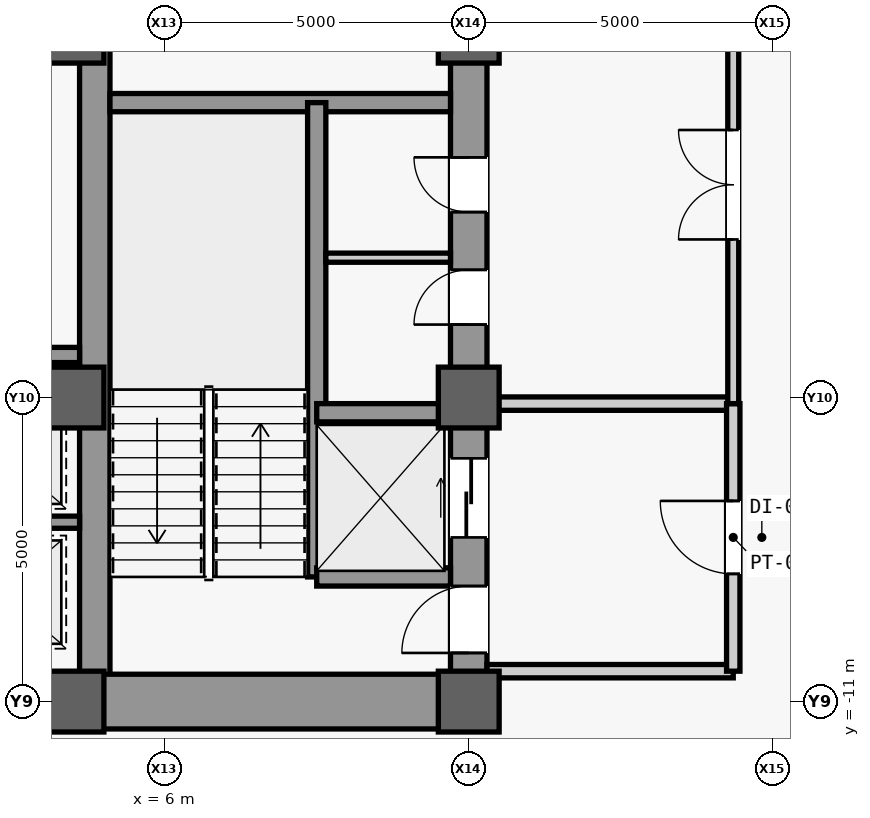
"""IFC4 building model, lengths in metres.
Left out: names, types, materials, properties, quantities, classifications, styles, units other than length and angle.
Written with IfcOpenShell. Run it as: python <this file> out.ifc"""

import sys

from ifc_helpers import new_model, si_unit, direction, frame, frame_2d, origin, origin_2d, place, context, subcontext, project, spatial, rectangle, extrude, source, transform, mapped, element, fill, save


model = new_model("IFC4")
c1 = context("Model", 3, precision=1e-05, world=origin(), true_north=direction((0.0, 1.0)))
c2 = subcontext(c1, "Body", "Model", "MODEL_VIEW")
j1 = project(units=[si_unit("LENGTHUNIT", "METRE"), si_unit("PLANEANGLEUNIT", "RADIAN")], contexts=[c1])
p1 = place(None, origin())
s1 = spatial("IfcSite", under=j1, at=p1, CompositionType="ELEMENT")
p2 = place(p1, origin())
s2 = spatial("IfcBuilding", under=s1, at=p2, CompositionType="ELEMENT")
p3 = place(p2, frame((0.0, 0.0, 83.0)))
s3 = spatial("IfcBuildingStorey", under=s2, at=p3, CompositionType="ELEMENT", Elevation=83.0)
m1 = source(origin(), c2, "Body", "SweptSolid", [
    extrude(rectangle(XDim=22.0, YDim=0.6, at=frame_2d((11.0, 0.0))), origin(), (0.0, 0.0, 1.0), 3.94),
])
p4 = place(p3, frame((11.0, -11.0, 0.0), z_axis=(0.0, 0.0, 1.0), x_axis=(0.0, 1.0, 0.0)))
e1 = element("IfcWall", 1, at=p4, inside=s3, PredefinedType="SHEAR", context=c2, shape_type="MappedRepresentation", body=[
    mapped(m1, transform((0.0, 0.0, 0.0), scale=1.0)),
])
m2 = source(origin(), c2, "Body", "SweptSolid", [
    extrude(rectangle(XDim=1.1, YDim=2.2, at=frame_2d((0.55, 1.1))), frame((0.0, 0.31, 0.0), z_axis=(0.0, -1.0, 0.0), x_axis=(1.0, 0.0, 0.0)), (0.0, 0.0, 1.0), 0.62),
])
p5 = place(p4, frame((0.8, 0.0, 0.0)))
e2 = element("IfcOpeningElement", 2, at=p5, cuts=e1, PredefinedType="OPENING", context=c2, shape_type="MappedRepresentation", body=[
    mapped(m2, transform((0.0, 0.0, 0.0), scale=1.0)),
])
m3 = source(origin(), c2, "Body", "SweptSolid", [
    extrude(rectangle(XDim=0.9, YDim=2.15, at=frame_2d((0.45, 1.075))), frame((0.0, 0.31, 0.0), z_axis=(0.0, -1.0, 0.0), x_axis=(1.0, 0.0, 0.0)), (0.0, 0.0, 1.0), 0.62),
])
p6 = place(p4, frame((6.2, 0.0, 0.0)))
e3 = element("IfcOpeningElement", 3, at=p6, cuts=e1, PredefinedType="OPENING", context=c2, shape_type="MappedRepresentation", body=[
    mapped(m3, transform((0.0, 0.0, 0.0), scale=1.0)),
])
p7 = place(p4, frame((8.05, 0.0, 0.0)))
e4 = element("IfcOpeningElement", 4, at=p7, cuts=e1, PredefinedType="OPENING", context=c2, shape_type="MappedRepresentation", body=[
    mapped(m3, transform((0.0, 0.0, 0.0), scale=1.0)),
])
m4 = source(origin(), c2, "Body", "SweptSolid", [
    extrude(rectangle(XDim=1.3, YDim=2.3, at=frame_2d((0.65, 1.15))), frame((0.0, 0.31, 0.0), z_axis=(0.0, -1.0, 0.0), x_axis=(1.0, 0.0, 0.0)), (0.0, 0.0, 1.0), 0.62),
])
p8 = place(p4, frame((2.7, 0.0, 0.0)))
e5 = element("IfcOpeningElement", 5, at=p8, cuts=e1, PredefinedType="OPENING", context=c2, shape_type="MappedRepresentation", body=[
    mapped(m4, transform((0.0, 0.0, 0.0), scale=1.0)),
])
p9 = place(p4, frame((13.35, 0.0, 0.0)))
e6 = element("IfcOpeningElement", 6, at=p9, cuts=e1, PredefinedType="OPENING", context=c2, shape_type="MappedRepresentation", body=[
    mapped(m4, transform((0.0, 0.0, 0.0), scale=1.0)),
])
m5 = source(origin(), c2, "Body", "SweptSolid", [
    extrude(rectangle(XDim=21.4, YDim=0.5, at=frame_2d((10.7, 0.0))), origin(), (0.0, 0.0, 1.0), 3.94),
])
p10 = place(p3, frame((4.85, -10.7, 0.0), z_axis=(0.0, 0.0, 1.0), x_axis=(0.0, 1.0, 0.0)))
e7 = element("IfcWall", 7, at=p10, inside=s3, PredefinedType="SHEAR", context=c2, shape_type="MappedRepresentation", body=[
    mapped(m5, transform((0.0, 0.0, 0.0), scale=1.0)),
])
m6 = source(origin(), c2, "Body", "SweptSolid", [
    extrude(rectangle(XDim=5.85, YDim=0.9, at=frame_2d((2.925, 0.0))), origin(), (0.0, 0.0, 1.0), 3.94),
])
p11 = place(p3, frame((4.85, -11.0, 0.0), z_axis=(0.0, 0.0, 1.0), x_axis=(1.0, 0.0, 0.0)))
e8 = element("IfcWall", 8, at=p11, inside=s3, PredefinedType="SHEAR", context=c2, shape_type="MappedRepresentation", body=[
    mapped(m6, transform((0.0, 0.0, 0.0), scale=1.0)),
])
m7 = source(origin(), c2, "Body", "SweptSolid", [
    extrude(rectangle(XDim=5.6, YDim=0.3, at=frame_2d((2.8, 0.0))), origin(), (0.0, 0.0, 1.0), 3.94),
])
p12 = place(p3, frame((5.1, -1.15, 0.0), z_axis=(0.0, 0.0, 1.0), x_axis=(1.0, 0.0, 0.0)))
e9 = element("IfcWall", 9, at=p12, inside=s3, PredefinedType="SHEAR", context=c2, shape_type="MappedRepresentation", body=[
    mapped(m7, transform((0.0, 0.0, 0.0), scale=1.0)),
])
m8 = source(origin(), c2, "Body", "SweptSolid", [
    extrude(rectangle(XDim=9.2, YDim=0.5, at=frame_2d((4.6, 0.0))), origin(), (0.0, 0.0, 1.0), 3.94),
])
p13 = place(p3, frame((-4.6, -11.0, 0.0), z_axis=(0.0, 0.0, 1.0), x_axis=(1.0, 0.0, 0.0)))
e10 = element("IfcWall", 10, at=p13, inside=s3, PredefinedType="SHEAR", context=c2, shape_type="MappedRepresentation", body=[
    mapped(m8, transform((0.0, 0.0, 0.0), scale=1.0)),
])
m9 = source(origin(), c2, "Body", "SweptSolid", [
    extrude(rectangle(XDim=1.8, YDim=2.25, at=frame_2d((0.9, 1.125))), frame((0.0, 0.26, 0.0), z_axis=(0.0, -1.0, 0.0), x_axis=(1.0, 0.0, 0.0)), (0.0, 0.0, 1.0), 0.52),
])
p14 = place(p13, frame((3.7, 0.0, 0.0)))
e11 = element("IfcOpeningElement", 11, at=p14, cuts=e10, PredefinedType="OPENING", context=c2, shape_type="MappedRepresentation", body=[
    mapped(m9, transform((0.0, 0.0, 0.0), scale=1.0)),
])
m10 = source(origin(), c2, "Body", "SweptSolid", [
    extrude(rectangle(XDim=1.0, YDim=1.0, at=origin_2d()), origin(), (0.0, 0.0, 1.0), 4.2),
])
for number, where, z_axis, x_axis in (
    (12, (4.5, -11.0, 0.0), (0.0, 0.0, 1.0), (1.0, 0.0, 0.0)),
    (13, (4.5, -6.0, 0.0), (0.0, 0.0, 1.0), (1.0, 0.0, 0.0)),
    (14, (4.5, 0.0, 0.0), (0.0, 0.0, 1.0), (1.0, 0.0, 0.0)),
    (15, (11.0, -11.0, 0.0), (0.0, 0.0, 1.0), (1.0, 0.0, 0.0)),
    (16, (11.0, -6.0, 0.0), (0.0, 0.0, 1.0), (1.0, 0.0, 0.0)),
    (17, (11.0, 0.0, 0.0), (0.0, 0.0, 1.0), (1.0, 0.0, 0.0)),
):
    element("IfcColumn", number, at=place(p3, frame(where, z_axis=z_axis, x_axis=x_axis)), inside=s3, PredefinedType="COLUMN", context=c2, shape_type="MappedRepresentation", body=[
        mapped(m10, transform((0.0, 0.0, 0.0), scale=1.0)),
    ])
m11 = source(origin(), c2, "Body", "SweptSolid", [
    extrude(rectangle(XDim=7.8, YDim=0.3, at=frame_2d((3.9, 0.0))), origin(), (0.0, 0.0, 1.0), 3.94),
])
p15 = place(p3, frame((8.5, -8.95, 0.0), z_axis=(0.0, 0.0, 1.0), x_axis=(0.0, 1.0, 0.0)))
e18 = element("IfcWall", 18, at=p15, inside=s3, PredefinedType="SHEAR", context=c2, shape_type="MappedRepresentation", body=[
    mapped(m11, transform((0.0, 0.0, 0.0), scale=1.0)),
])
m12 = source(origin(), c2, "Body", "SweptSolid", [
    extrude(rectangle(XDim=2.2, YDim=0.3, at=frame_2d((1.1, 0.0))), origin(), (0.0, 0.0, 1.0), 3.94),
])
for number, where, z_axis, x_axis in (
    (19, (8.5, -8.95, 0.0), (0.0, 0.0, 1.0), (1.0, 0.0, 0.0)),
    (20, (8.5, -6.25, 0.0), (0.0, 0.0, 1.0), (1.0, 0.0, 0.0)),
):
    element("IfcWall", number, at=place(p3, frame(where, z_axis=z_axis, x_axis=x_axis)), inside=s3, PredefinedType="SHEAR", context=c2, shape_type="MappedRepresentation", body=[
        mapped(m12, transform((0.0, 0.0, 0.0), scale=1.0)),
    ])
m13 = source(origin(), c2, "Body", "SweptSolid", [
    extrude(rectangle(XDim=2.05, YDim=0.15, at=frame_2d((1.025, 0.0))), origin(), (0.0, 0.0, 1.0), 3.94),
])
p16 = place(p3, frame((8.65, -3.7, 0.0), z_axis=(0.0, 0.0, 1.0), x_axis=(1.0, 0.0, 0.0)))
e21 = element("IfcWall", 21, at=p16, inside=s3, PredefinedType="PARTITIONING", context=c2, shape_type="MappedRepresentation", body=[
    mapped(m13, transform((0.0, 0.0, 0.0), scale=1.0)),
])
m14 = source(origin(), c2, "Body", "SweptSolid", [
    extrude(rectangle(XDim=4.05, YDim=0.22, at=frame_2d((2.025, 0.0))), origin(), (0.0, 0.0, 1.0), 3.94),
])
p17 = place(p3, frame((11.3, -10.5, 0.0), z_axis=(0.0, 0.0, 1.0), x_axis=(1.0, 0.0, 0.0)))
e22 = element("IfcWall", 22, at=p17, inside=s3, PredefinedType="PARTITIONING", context=c2, shape_type="MappedRepresentation", body=[
    mapped(m14, transform((0.0, 0.0, 0.0), scale=1.0)),
])
m15 = source(origin(), c2, "Body", "SweptSolid", [
    extrude(rectangle(XDim=4.05, YDim=0.22, at=frame_2d((2.025, 0.0))), origin(), (0.0, 0.0, 1.0), 3.085),
])
p18 = place(p3, frame((11.3, -6.1, 0.0), z_axis=(0.0, 0.0, 1.0), x_axis=(1.0, 0.0, 0.0)))
e23 = element("IfcWall", 23, at=p18, inside=s3, PredefinedType="PARTITIONING", context=c2, shape_type="MappedRepresentation", body=[
    mapped(m15, transform((0.0, 0.0, 0.0), scale=1.0)),
])
m16 = source(origin(), c2, "Body", "SweptSolid", [
    extrude(rectangle(XDim=4.4, YDim=0.22, at=frame_2d((2.2, 0.0))), origin(), (0.0, 0.0, 1.0), 3.94),
])
p19 = place(p3, frame((15.35, -10.5, 0.0), z_axis=(0.0, 0.0, 1.0), x_axis=(0.0, 1.0, 0.0)))
e24 = element("IfcWall", 24, at=p19, inside=s3, PredefinedType="PARTITIONING", context=c2, shape_type="MappedRepresentation", body=[
    mapped(m16, transform((0.0, 0.0, 0.0), scale=1.0)),
])
m17 = source(origin(), c2, "Body", "SweptSolid", [
    extrude(rectangle(XDim=1.2, YDim=2.2, at=frame_2d((0.6, 1.1))), frame((0.0, 0.12, 0.0), z_axis=(0.0, -1.0, 0.0), x_axis=(1.0, 0.0, 0.0)), (0.0, 0.0, 1.0), 0.24),
])
p20 = place(p19, frame((1.6, 0.0, 0.0)))
e25 = element("IfcOpeningElement", 25, at=p20, cuts=e24, PredefinedType="OPENING", context=c2, shape_type="MappedRepresentation", body=[
    mapped(m17, transform((0.0, 0.0, 0.0), scale=1.0)),
])
m18 = source(origin(), c2, "Body", "SweptSolid", [
    extrude(rectangle(XDim=16.6, YDim=0.18, at=frame_2d((8.3, 0.0))), origin(), (0.0, 0.0, 1.0), 3.94),
])
p21 = place(p3, frame((15.35, -6.1, 0.0), z_axis=(0.0, 0.0, 1.0), x_axis=(0.0, 1.0, 0.0)))
e26 = element("IfcWall", 26, at=p21, inside=s3, PredefinedType="PARTITIONING", context=c2, shape_type="MappedRepresentation", body=[
    mapped(m18, transform((0.0, 0.0, 0.0), scale=1.0)),
])
m19 = source(origin(), c2, "Body", "SweptSolid", [
    extrude(rectangle(XDim=1.8, YDim=2.25, at=frame_2d((0.9, 1.125))), frame((0.0, 0.1, 0.0), z_axis=(0.0, -1.0, 0.0), x_axis=(1.0, 0.0, 0.0)), (0.0, 0.0, 1.0), 0.2),
])
p22 = place(p21, frame((2.7, 0.0, 0.0)))
e27 = element("IfcOpeningElement", 27, at=p22, cuts=e26, PredefinedType="OPENING", context=c2, shape_type="MappedRepresentation", body=[
    mapped(m19, transform((0.0, 0.0, 0.0), scale=1.0)),
])
p23 = place(p21, frame((13.0, 0.0, 0.0)))
e28 = element("IfcOpeningElement", 28, at=p23, cuts=e26, PredefinedType="OPENING", context=c2, shape_type="MappedRepresentation", body=[
    mapped(m19, transform((0.0, 0.0, 0.0), scale=1.0)),
])
m20 = source(origin(), c2, "Body", "SweptSolid", [
    extrude(rectangle(XDim=2.45, YDim=0.2, at=frame_2d((1.225, 0.0))), origin(), (0.0, 0.0, 1.0), 3.94),
])
p24 = place(p3, frame((2.15, -8.05, 0.0), z_axis=(0.0, 0.0, 1.0), x_axis=(1.0, 0.0, 0.0)))
e29 = element("IfcWall", 29, at=p24, inside=s3, PredefinedType="SHEAR", context=c2, shape_type="MappedRepresentation", body=[
    mapped(m20, transform((0.0, 0.0, 0.0), scale=1.0)),
])
m21 = source(origin(), c2, "Body", "SweptSolid", [
    extrude(rectangle(XDim=9.2, YDim=0.25, at=frame_2d((4.6, 0.0))), origin(), (0.0, 0.0, 1.0), 3.94),
])
p25 = place(p3, frame((-4.6, -5.3, 0.0), z_axis=(0.0, 0.0, 1.0), x_axis=(1.0, 0.0, 0.0)))
e30 = element("IfcWall", 30, at=p25, inside=s3, PredefinedType="SHEAR", context=c2, shape_type="MappedRepresentation", body=[
    mapped(m21, transform((0.0, 0.0, 0.0), scale=1.0)),
])
m22 = source(origin(), c2, "Body", "SweptSolid", [
    extrude(rectangle(XDim=1.05, YDim=2.2, at=frame_2d((0.525, 1.1))), frame((0.0, 0.135, 0.0), z_axis=(0.0, -1.0, 0.0), x_axis=(1.0, 0.0, 0.0)), (0.0, 0.0, 1.0), 0.27),
])
p26 = place(p25, frame((4.075, 0.0, 0.0)))
e31 = element("IfcOpeningElement", 31, at=p26, cuts=e30, PredefinedType="OPENING", context=c2, shape_type="MappedRepresentation", body=[
    mapped(m22, transform((0.0, 0.0, 0.0), scale=1.0)),
])
m23 = source(origin(), c2, "Body", "SweptSolid", [
    extrude(rectangle(XDim=1.1, YDim=2.2, at=frame_2d((0.55, 1.1))), frame((0.0, 0.025, 0.0), z_axis=(0.0, -1.0, 0.0), x_axis=(1.0, 0.0, 0.0)), (0.0, 0.0, 1.0), 0.05),
])
p27 = place(p5, origin())
e32 = element("IfcDoor", 32, at=p27, inside=s3, OperationType="SINGLE_SWING_LEFT", PredefinedType="DOOR", context=c2, shape_type="MappedRepresentation", body=[
    mapped(m23, transform((0.0, 0.0, 0.0), scale=1.0)),
])
fill(e2, e32)
m24 = source(origin(), c2, "Body", "SweptSolid", [
    extrude(rectangle(XDim=0.9, YDim=2.15, at=frame_2d((0.45, 1.075))), frame((0.0, 0.025, 0.0), z_axis=(0.0, -1.0, 0.0), x_axis=(1.0, 0.0, 0.0)), (0.0, 0.0, 1.0), 0.05),
])
p28 = place(p6, origin())
e33 = element("IfcDoor", 33, at=p28, inside=s3, OperationType="SINGLE_SWING_LEFT", PredefinedType="DOOR", context=c2, shape_type="MappedRepresentation", body=[
    mapped(m24, transform((0.0, 0.0, 0.0), scale=1.0)),
])
fill(e3, e33)
p29 = place(p7, origin())
e34 = element("IfcDoor", 34, at=p29, inside=s3, OperationType="SINGLE_SWING_RIGHT", PredefinedType="DOOR", context=c2, shape_type="MappedRepresentation", body=[
    mapped(m24, transform((0.0, 0.0, 0.0), scale=1.0)),
])
fill(e4, e34)
m25 = source(origin(), c2, "Body", "SweptSolid", [
    extrude(rectangle(XDim=1.2, YDim=2.2, at=frame_2d((0.6, 1.1))), frame((0.0, 0.025, 0.0), z_axis=(0.0, -1.0, 0.0), x_axis=(1.0, 0.0, 0.0)), (0.0, 0.0, 1.0), 0.05),
])
p30 = place(p20, origin())
e35 = element("IfcDoor", 35, at=p30, inside=s3, OperationType="SINGLE_SWING_RIGHT", PredefinedType="DOOR", context=c2, shape_type="MappedRepresentation", body=[
    mapped(m25, transform((0.0, 0.0, 0.0), scale=1.0)),
])
fill(e25, e35)
m26 = source(origin(), c2, "Body", "SweptSolid", [
    extrude(rectangle(XDim=1.8, YDim=2.25, at=frame_2d((0.9, 1.125))), frame((0.0, 0.025, 0.0), z_axis=(0.0, -1.0, 0.0), x_axis=(1.0, 0.0, 0.0)), (0.0, 0.0, 1.0), 0.05),
])
p31 = place(p22, origin())
e36 = element("IfcDoor", 36, at=p31, inside=s3, OperationType="SINGLE_SWING_RIGHT", PredefinedType="DOOR", context=c2, shape_type="MappedRepresentation", body=[
    mapped(m26, transform((0.0, 0.0, 0.0), scale=1.0)),
])
fill(e27, e36)
m27 = source(origin(), c2, "Body", "SweptSolid", [
    extrude(rectangle(XDim=1.3, YDim=2.3, at=frame_2d((0.65, 1.15))), frame((0.0, 0.025, 0.0), z_axis=(0.0, -1.0, 0.0), x_axis=(1.0, 0.0, 0.0)), (0.0, 0.0, 1.0), 0.05),
])
p32 = place(p8, origin())
e37 = element("IfcDoor", 37, at=p32, inside=s3, OperationType="SLIDING_TO_LEFT", PredefinedType="DOOR", context=c2, shape_type="MappedRepresentation", body=[
    mapped(m27, transform((0.0, 0.0, 0.0), scale=1.0)),
])
fill(e5, e37)
save(model, sys.argv[1])
